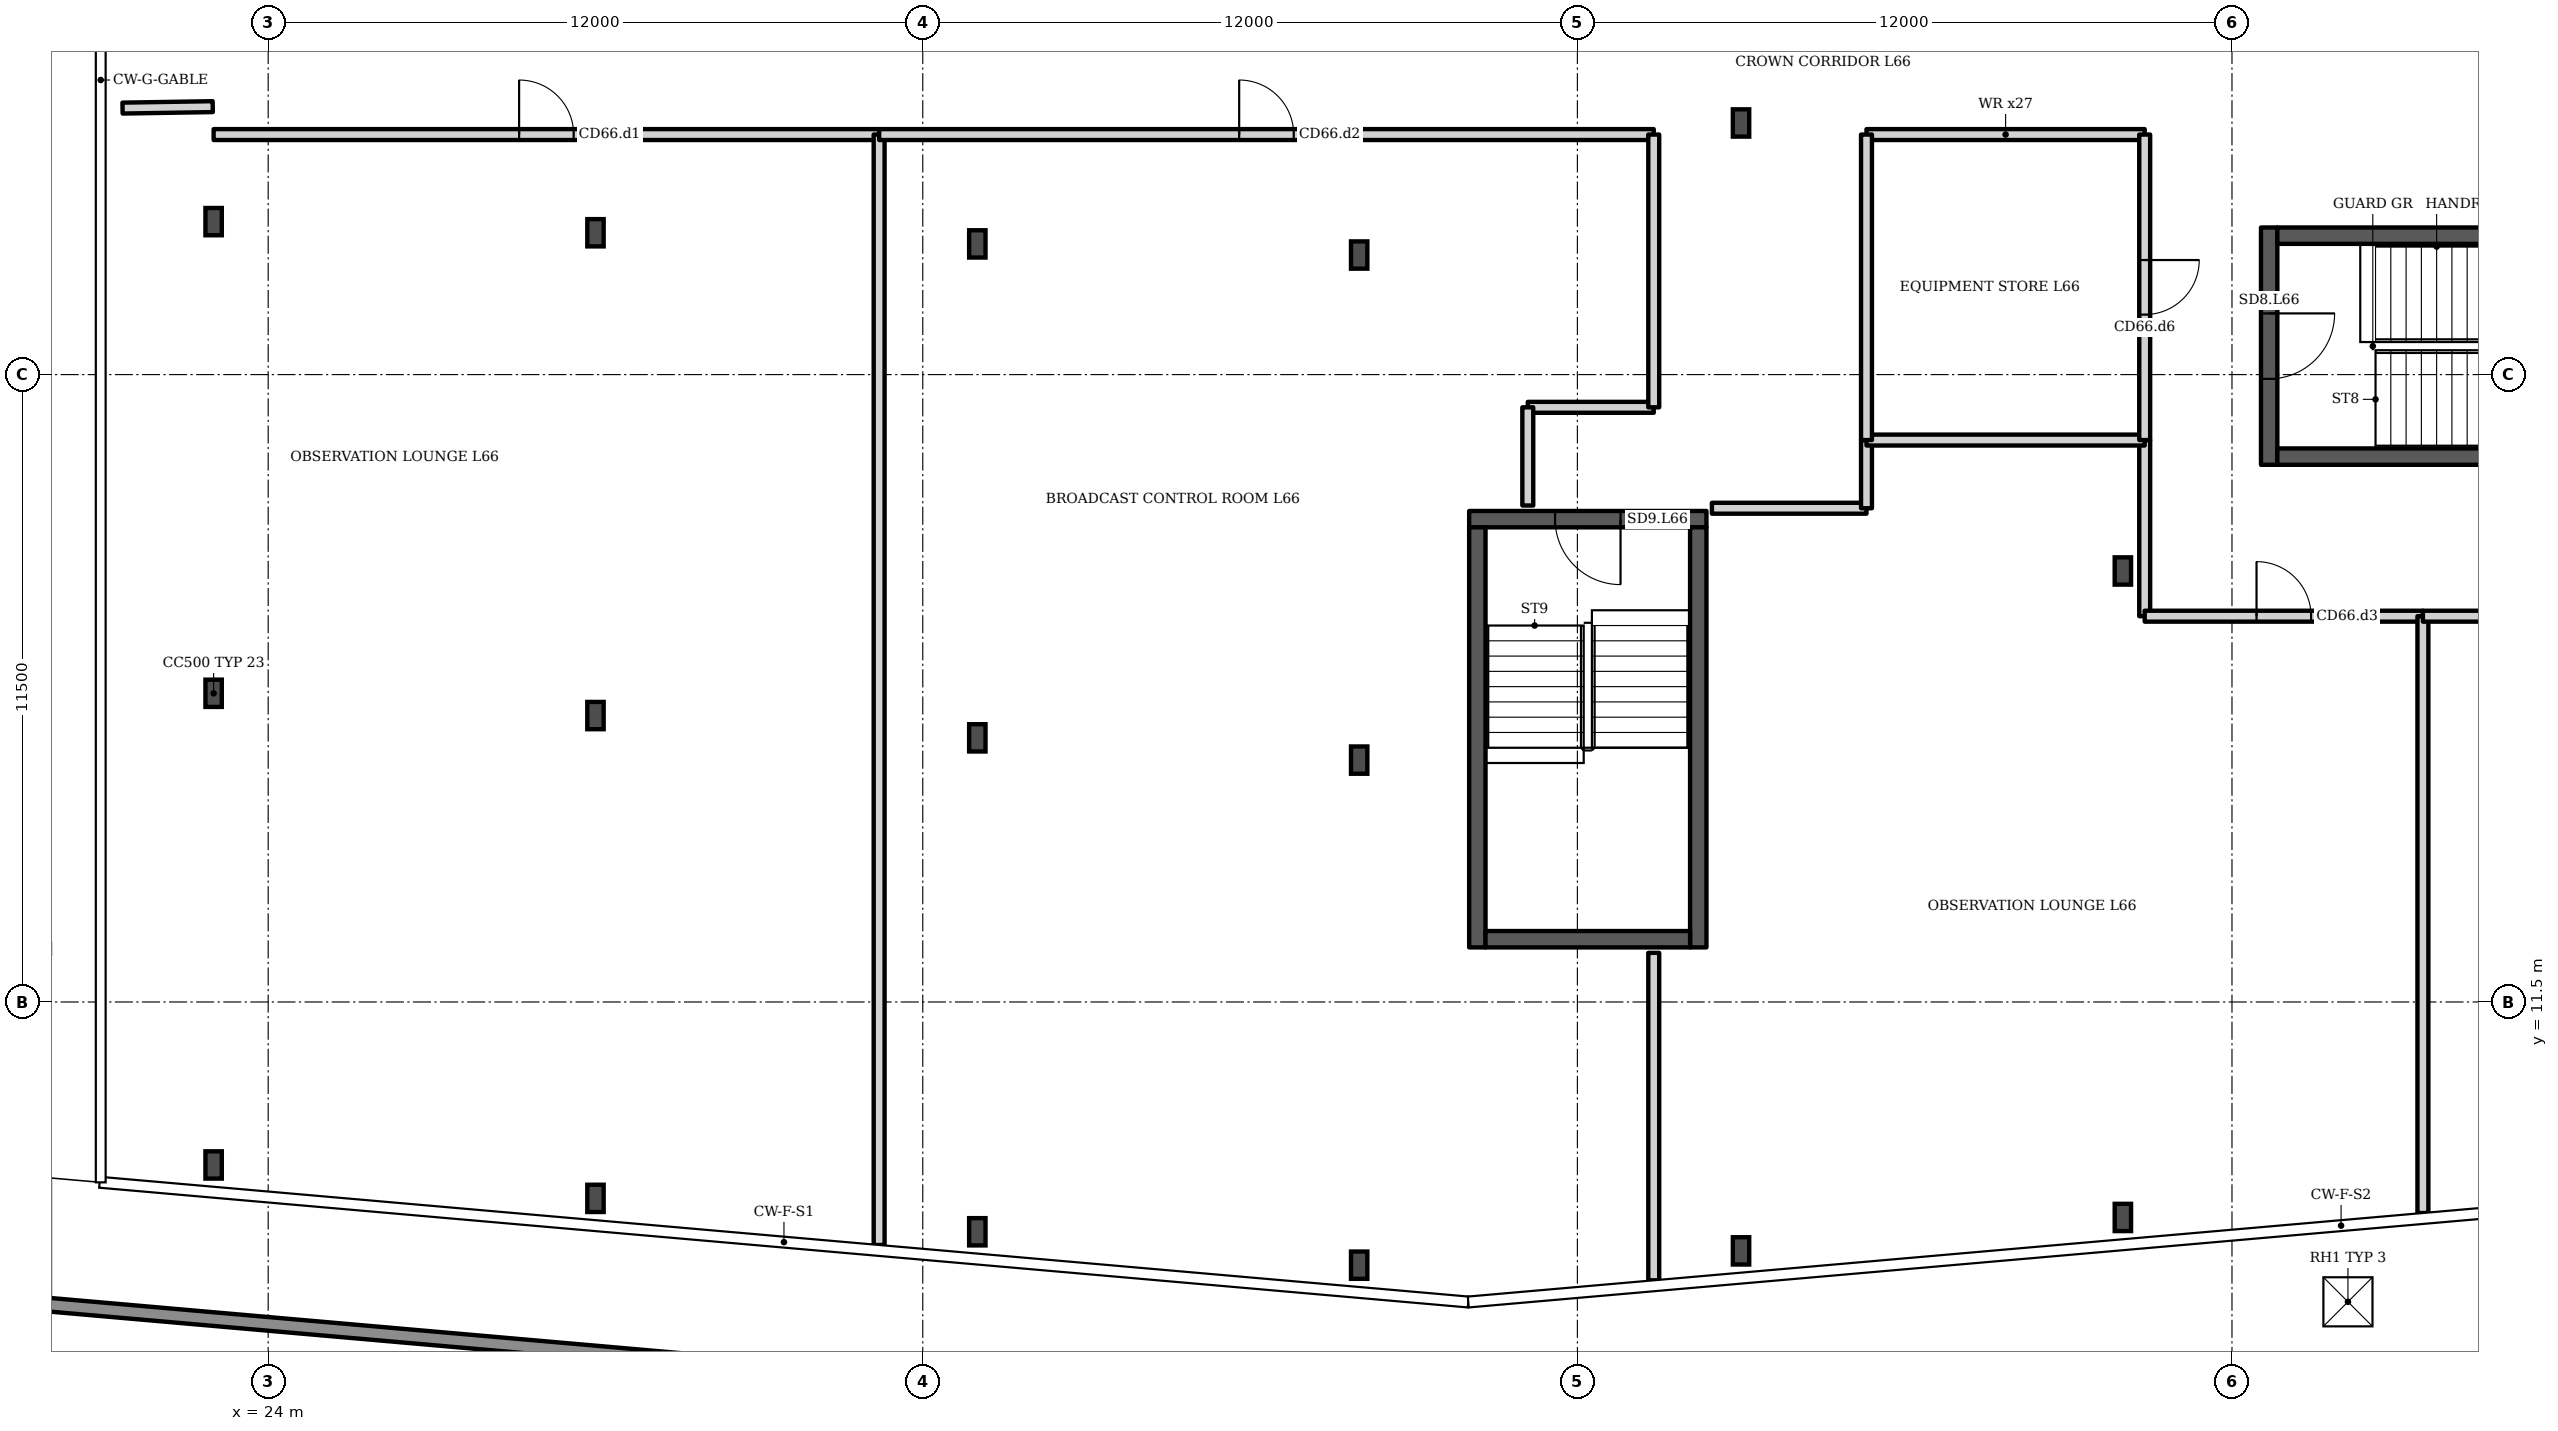
"""IFC4 building model, lengths in metres.
Left out: names, types, materials, properties, quantities, classifications, styles, units other than length and angle.
Written with IfcOpenShell. Run it as: python <this file> out.ifc"""

import sys

from ifc_helpers import new_model, si_unit, direction, frame, frame_2d, origin, origin_2d, place, context, subcontext, project, spatial, rectangle, i_section, extrude, element, fill, save


model = new_model("IFC4")
c1 = context("Model", 3, precision=1e-05, world=origin(), true_north=direction((0.0, 1.0)))
c2 = subcontext(c1, "Body", "Model", "MODEL_VIEW")
j1 = project(units=[si_unit("LENGTHUNIT", "METRE"), si_unit("PLANEANGLEUNIT", "RADIAN")], contexts=[c1])
p1 = place(None, origin())
s1 = spatial("IfcSite", under=j1, at=p1, CompositionType="ELEMENT")
p2 = place(p1, origin())
s2 = spatial("IfcBuilding", under=s1, at=p2, CompositionType="ELEMENT")
p3 = place(p2, frame((0.0, 0.0, 261.1)))
s3 = spatial("IfcBuildingStorey", under=s2, at=p3, CompositionType="ELEMENT", Elevation=261.1)
for number, where, z_axis, x_axis in (
    (1, (23.0, 8.513, 0.0), (0.0, 0.0, 1.0), (1.0, 0.0, 0.0)),
    (2, (23.0, 17.158, 0.0), (0.0, 0.0, 1.0), (1.0, 0.0, 0.0)),
    (3, (23.0, 25.804, 0.0), (0.0, 0.0, 1.0), (1.0, 0.0, 0.0)),
):
    element("IfcColumn", number, at=place(p3, frame(where, z_axis=z_axis, x_axis=x_axis)), inside=s3, PredefinedType="COLUMN", context=c2, shape_type="SweptSolid", body=[
        extrude(i_section(OverallWidth=0.3, OverallDepth=0.5, WebThickness=0.014, FlangeThickness=0.028, FilletRadius=0.027, at=origin_2d()), origin(), (0.0, 0.0, 1.0), 2.365),
    ])
for number, where, z_axis, x_axis in (
    (4, (30.0, 7.9, 0.0), (0.0, 0.0, 1.0), (1.0, 0.0, 0.0)),
    (5, (30.0, 16.75, 0.0), (0.0, 0.0, 1.0), (1.0, 0.0, 0.0)),
    (6, (30.0, 25.6, 0.0), (0.0, 0.0, 1.0), (1.0, 0.0, 0.0)),
):
    element("IfcColumn", number, at=place(p3, frame(where, z_axis=z_axis, x_axis=x_axis)), inside=s3, PredefinedType="COLUMN", context=c2, shape_type="SweptSolid", body=[
        extrude(i_section(OverallWidth=0.3, OverallDepth=0.5, WebThickness=0.014, FlangeThickness=0.028, FilletRadius=0.027, at=origin_2d()), origin(), (0.0, 0.0, 1.0), 5.194),
    ])
for number, where, z_axis, x_axis in (
    (7, (37.0, 7.288, 0.0), (0.0, 0.0, 1.0), (1.0, 0.0, 0.0)),
    (8, (37.0, 16.342, 0.0), (0.0, 0.0, 1.0), (1.0, 0.0, 0.0)),
    (9, (37.0, 25.396, 0.0), (0.0, 0.0, 1.0), (1.0, 0.0, 0.0)),
    (10, (44.0, 6.675, 0.0), (0.0, 0.0, 1.0), (1.0, 0.0, 0.0)),
    (11, (44.0, 15.934, 0.0), (0.0, 0.0, 1.0), (1.0, 0.0, 0.0)),
    (12, (44.0, 25.192, 0.0), (0.0, 0.0, 1.0), (1.0, 0.0, 0.0)),
    (13, (51.0, 6.938, 0.0), (0.0, 0.0, 1.0), (1.0, 0.0, 0.0)),
    (14, (51.0, 27.613, 0.0), (0.0, 0.0, 1.0), (1.0, 0.0, 0.0)),
    (15, (58.0, 7.55, 0.0), (0.0, 0.0, 1.0), (1.0, 0.0, 0.0)),
    (16, (58.0, 19.4, 0.0), (0.0, 0.0, 1.0), (1.0, 0.0, 0.0)),
):
    element("IfcColumn", number, at=place(p3, frame(where, z_axis=z_axis, x_axis=x_axis)), inside=s3, PredefinedType="COLUMN", context=c2, shape_type="SweptSolid", body=[
        extrude(i_section(OverallWidth=0.3, OverallDepth=0.5, WebThickness=0.014, FlangeThickness=0.028, FilletRadius=0.027, at=origin_2d()), origin(), (0.0, 0.0, 1.0), 3.2),
    ])
p4 = place(p3, frame((79.305, 5.976, 0.0), z_axis=(0.0, 0.0, 1.0), x_axis=(-0.996196, -0.087159, 0.0)))
e17 = element("IfcWall", 17, at=p4, inside=s3, PredefinedType="PARAPET", context=c2, shape_type="SweptSolid", body=[
    extrude(rectangle(XDim=29.918, YDim=0.25, at=frame_2d((14.959, 0.0))), origin(), (0.0, 0.0, 1.0), 1.1),
])
p5 = place(p3, frame((49.47, 3.371, 0.0), z_axis=(0.0, 0.0, 1.0), x_axis=(-0.996191, 0.087154, 0.0)))
e18 = element("IfcWall", 18, at=p5, inside=s3, PredefinedType="PARAPET", context=c2, shape_type="SweptSolid", body=[
    extrude(rectangle(XDim=29.833, YDim=0.25, at=frame_2d((14.917, 0.0))), origin(), (0.0, 0.0, 1.0), 1.1),
])
p6 = place(p3, frame((23.0, 27.4, 0.0), z_axis=(0.0, 0.0, 1.0), x_axis=(1.0, 0.0, 0.0)))
e19 = element("IfcWall", 19, at=p6, inside=s3, PredefinedType="PARTITIONING", context=c2, shape_type="SweptSolid", body=[
    extrude(rectangle(XDim=12.2, YDim=0.2, at=frame_2d((6.1, 0.0))), origin(), (0.0, 0.0, 1.0), 2.8),
])
p7 = place(p6, frame((5.6, 0.0, 0.0)))
e20 = element("IfcOpeningElement", 20, at=p7, cuts=e19, PredefinedType="OPENING", context=c2, shape_type="SweptSolid", body=[
    extrude(rectangle(XDim=1.0, YDim=2.1, at=frame_2d((0.5, 1.05))), frame((0.0, 0.11, 0.0), z_axis=(0.0, -1.0, 0.0), x_axis=(1.0, 0.0, 0.0)), (0.0, 0.0, 1.0), 0.22),
])
p8 = place(p3, frame((35.2, 27.4, 0.0), z_axis=(0.0, 0.0, 1.0), x_axis=(0.0, -1.0, 0.0)))
e21 = element("IfcWall", 21, at=p8, inside=s3, PredefinedType="PARTITIONING", context=c2, shape_type="SweptSolid", body=[
    extrude(rectangle(XDim=20.354, YDim=0.2, at=frame_2d((10.177, 0.0))), origin(), (0.0, 0.0, 1.0), 2.8),
])
p9 = place(p3, frame((49.4, 22.4, 0.0), z_axis=(0.0, 0.0, 1.0), x_axis=(-1.0, 0.0, 0.0)))
e22 = element("IfcWall", 22, at=p9, inside=s3, PredefinedType="PARTITIONING", context=c2, shape_type="SweptSolid", body=[
    extrude(rectangle(XDim=2.309, YDim=0.2, at=frame_2d((1.154, 0.0))), origin(), (0.0, 0.0, 1.0), 2.8),
])
p10 = place(p3, frame((47.091, 22.4, 0.0), z_axis=(0.0, 0.0, 1.0), x_axis=(0.0, -1.0, 0.0)))
e23 = element("IfcWall", 23, at=p10, inside=s3, PredefinedType="PARTITIONING", context=c2, shape_type="SweptSolid", body=[
    extrude(rectangle(XDim=1.8, YDim=0.2, at=frame_2d((0.9, 0.0))), origin(), (0.0, 0.0, 1.0), 2.8),
])
p11 = place(p3, frame((35.2, 27.4, 0.0), z_axis=(0.0, 0.0, 1.0), x_axis=(1.0, 0.0, 0.0)))
e24 = element("IfcWall", 24, at=p11, inside=s3, PredefinedType="PARTITIONING", context=c2, shape_type="SweptSolid", body=[
    extrude(rectangle(XDim=14.2, YDim=0.2, at=frame_2d((7.1, 0.0))), origin(), (0.0, 0.0, 1.0), 2.8),
])
p12 = place(p11, frame((6.6, 0.0, 0.0)))
e25 = element("IfcOpeningElement", 25, at=p12, cuts=e24, PredefinedType="OPENING", context=c2, shape_type="SweptSolid", body=[
    extrude(rectangle(XDim=1.0, YDim=2.1, at=frame_2d((0.5, 1.05))), frame((0.0, 0.11, 0.0), z_axis=(0.0, -1.0, 0.0), x_axis=(1.0, 0.0, 0.0)), (0.0, 0.0, 1.0), 0.22),
])
p13 = place(p3, frame((49.4, 12.4, 0.0), z_axis=(0.0, 0.0, 1.0), x_axis=(0.0, -1.0, 0.0)))
e26 = element("IfcWall", 26, at=p13, inside=s3, PredefinedType="PARTITIONING", context=c2, shape_type="SweptSolid", body=[
    extrude(rectangle(XDim=6.002, YDim=0.2, at=frame_2d((3.001, 0.0))), origin(), (0.0, 0.0, 1.0), 2.8),
])
p14 = place(p3, frame((50.466, 20.55, 0.0), z_axis=(0.0, 0.0, 1.0), x_axis=(1.0, 0.0, 0.0)))
e27 = element("IfcWall", 27, at=p14, inside=s3, PredefinedType="PARTITIONING", context=c2, shape_type="SweptSolid", body=[
    extrude(rectangle(XDim=2.834, YDim=0.2, at=frame_2d((1.417, 0.0))), origin(), (0.0, 0.0, 1.0), 2.8),
])
p15 = place(p3, frame((53.3, 20.55, 0.0), z_axis=(0.0, 0.0, 1.0), x_axis=(0.0, 1.0, 0.0)))
e28 = element("IfcWall", 28, at=p15, inside=s3, PredefinedType="PARTITIONING", context=c2, shape_type="SweptSolid", body=[
    extrude(rectangle(XDim=1.25, YDim=0.2, at=frame_2d((0.625, 0.0))), origin(), (0.0, 0.0, 1.0), 2.8),
])
p16 = place(p3, frame((58.4, 21.8, 0.0), z_axis=(0.0, 0.0, 1.0), x_axis=(0.0, -1.0, 0.0)))
e29 = element("IfcWall", 29, at=p16, inside=s3, PredefinedType="PARTITIONING", context=c2, shape_type="SweptSolid", body=[
    extrude(rectangle(XDim=3.228, YDim=0.2, at=frame_2d((1.614, 0.0))), origin(), (0.0, 0.0, 1.0), 2.8),
])
p17 = place(p3, frame((58.4, 18.572, 0.0), z_axis=(0.0, 0.0, 1.0), x_axis=(1.0, 0.0, 0.0)))
e30 = element("IfcWall", 30, at=p17, inside=s3, PredefinedType="PARTITIONING", context=c2, shape_type="SweptSolid", body=[
    extrude(rectangle(XDim=5.1, YDim=0.2, at=frame_2d((2.55, 0.0))), origin(), (0.0, 0.0, 1.0), 2.8),
])
p18 = place(p17, frame((2.05, 0.0, 0.0)))
e31 = element("IfcOpeningElement", 31, at=p18, cuts=e30, PredefinedType="OPENING", context=c2, shape_type="SweptSolid", body=[
    extrude(rectangle(XDim=1.0, YDim=2.1, at=frame_2d((0.5, 1.05))), frame((0.0, 0.11, 0.0), z_axis=(0.0, -1.0, 0.0), x_axis=(1.0, 0.0, 0.0)), (0.0, 0.0, 1.0), 0.22),
])
p19 = place(p3, frame((63.5, 18.572, 0.0), z_axis=(0.0, 0.0, 1.0), x_axis=(0.0, -1.0, 0.0)))
e32 = element("IfcWall", 32, at=p19, inside=s3, PredefinedType="PARTITIONING", context=c2, shape_type="SweptSolid", body=[
    extrude(rectangle(XDim=10.94, YDim=0.2, at=frame_2d((5.47, 0.0))), origin(), (0.0, 0.0, 1.0), 2.8),
])
p20 = place(p3, frame((53.3, 21.8, 0.0), z_axis=(0.0, 0.0, 1.0), x_axis=(1.0, 0.0, 0.0)))
e33 = element("IfcWall", 33, at=p20, inside=s3, PredefinedType="PARTITIONING", context=c2, shape_type="SweptSolid", body=[
    extrude(rectangle(XDim=5.1, YDim=0.2, at=frame_2d((2.55, 0.0))), origin(), (0.0, 0.0, 1.0), 2.8),
])
p21 = place(p3, frame((63.5, 18.572, 0.0), z_axis=(0.0, 0.0, 1.0), x_axis=(1.0, 0.0, 0.0)))
e34 = element("IfcWall", 34, at=p21, inside=s3, PredefinedType="PARTITIONING", context=c2, shape_type="SweptSolid", body=[
    extrude(rectangle(XDim=2.257, YDim=0.2, at=frame_2d((1.128, 0.0))), origin(), (0.0, 0.0, 1.0), 2.8),
])
p22 = place(p3, frame((53.3, 27.4, 0.0), z_axis=(0.0, 0.0, 1.0), x_axis=(1.0, 0.0, 0.0)))
e35 = element("IfcWall", 35, at=p22, inside=s3, PredefinedType="PARTITIONING", context=c2, shape_type="SweptSolid", body=[
    extrude(rectangle(XDim=5.1, YDim=0.2, at=frame_2d((2.55, 0.0))), origin(), (0.0, 0.0, 1.0), 2.8),
])
p23 = place(p3, frame((58.4, 27.4, 0.0), z_axis=(0.0, 0.0, 1.0), x_axis=(0.0, -1.0, 0.0)))
e36 = element("IfcWall", 36, at=p23, inside=s3, PredefinedType="PARTITIONING", context=c2, shape_type="SweptSolid", body=[
    extrude(rectangle(XDim=5.6, YDim=0.2, at=frame_2d((2.8, 0.0))), origin(), (0.0, 0.0, 1.0), 2.8),
])
p24 = place(p23, frame((2.3, 0.0, 0.0)))
e37 = element("IfcOpeningElement", 37, at=p24, cuts=e36, PredefinedType="OPENING", context=c2, shape_type="SweptSolid", body=[
    extrude(rectangle(XDim=1.0, YDim=2.1, at=frame_2d((0.5, 1.05))), frame((0.0, 0.11, 0.0), z_axis=(0.0, -1.0, 0.0), x_axis=(1.0, 0.0, 0.0)), (0.0, 0.0, 1.0), 0.22),
])
p25 = place(p3, frame((53.3, 21.8, 0.0), z_axis=(0.0, 0.0, 1.0), x_axis=(0.0, 1.0, 0.0)))
e38 = element("IfcWall", 38, at=p25, inside=s3, PredefinedType="PARTITIONING", context=c2, shape_type="SweptSolid", body=[
    extrude(rectangle(XDim=5.6, YDim=0.2, at=frame_2d((2.8, 0.0))), origin(), (0.0, 0.0, 1.0), 2.8),
])
p26 = place(p3, frame((21.33, 27.885, 0.0), z_axis=(0.0, 0.0, 1.0), x_axis=(0.999874, 0.016094, 0.0)))
e39 = element("IfcWall", 39, at=p26, inside=s3, PredefinedType="PARTITIONING", context=c2, shape_type="SweptSolid", body=[
    extrude(rectangle(XDim=1.654, YDim=0.2, at=frame_2d((0.827, 0.0))), origin(), (0.0, 0.0, 1.0), 2.8),
])
p27 = place(p3, frame((49.4, 27.4, 0.0), z_axis=(0.0, 0.0, 1.0), x_axis=(0.0, -1.0, 0.0)))
e40 = element("IfcWall", 40, at=p27, inside=s3, PredefinedType="PARTITIONING", context=c2, shape_type="SweptSolid", body=[
    extrude(rectangle(XDim=5.0, YDim=0.2, at=frame_2d((2.5, 0.0))), origin(), (0.0, 0.0, 1.0), 2.8),
])
p28 = place(p3, frame((60.682, 21.347, 0.0), z_axis=(0.0, 0.0, 1.0), x_axis=(0.0, 1.0, 0.0)))
e41 = element("IfcWall", 41, at=p28, inside=s3, PredefinedType="SHEAR", context=c2, shape_type="SweptSolid", body=[
    extrude(rectangle(XDim=4.35, YDim=0.3, at=frame_2d((2.175, 0.0))), origin(), (0.0, 0.0, 1.0), 2.8),
])
p29 = place(p28, frame((1.575, 0.0, 0.0)))
e42 = element("IfcOpeningElement", 42, at=p29, cuts=e41, PredefinedType="OPENING", context=c2, shape_type="SweptSolid", body=[
    extrude(rectangle(XDim=1.2, YDim=2.1, at=frame_2d((0.6, 1.05))), frame((0.0, 0.16, 0.0), z_axis=(0.0, -1.0, 0.0), x_axis=(1.0, 0.0, 0.0)), (0.0, 0.0, 1.0), 0.32),
])
p30 = place(p3, frame((46.016, 20.35, 0.0), z_axis=(0.0, 0.0, 1.0), x_axis=(1.0, 0.0, 0.0)))
e43 = element("IfcWall", 43, at=p30, inside=s3, PredefinedType="SHEAR", context=c2, shape_type="SweptSolid", body=[
    extrude(rectangle(XDim=4.35, YDim=0.3, at=frame_2d((2.175, 0.0))), origin(), (0.0, 0.0, 1.0), 2.8),
])
p31 = place(p30, frame((1.575, 0.0, 0.0)))
e44 = element("IfcOpeningElement", 44, at=p31, cuts=e43, PredefinedType="OPENING", context=c2, shape_type="SweptSolid", body=[
    extrude(rectangle(XDim=1.2, YDim=2.1, at=frame_2d((0.6, 1.05))), frame((0.0, 0.16, 0.0), z_axis=(0.0, -1.0, 0.0), x_axis=(1.0, 0.0, 0.0)), (0.0, 0.0, 1.0), 0.32),
])
for number, where, z_axis, x_axis in (
    (45, (60.832, 21.497, 0.0), (0.0, 0.0, 1.0), (1.0, 0.0, 0.0)),
    (46, (60.832, 25.547, 0.0), (0.0, 0.0, 1.0), (1.0, 0.0, 0.0)),
    (47, (46.166, 12.5, 0.0), (0.0, 0.0, 1.0), (0.0, 1.0, 0.0)),
    (48, (50.216, 12.5, 0.0), (0.0, 0.0, 1.0), (0.0, 1.0, 0.0)),
):
    element("IfcWall", number, at=place(p3, frame(where, z_axis=z_axis, x_axis=x_axis)), inside=s3, PredefinedType="SHEAR", context=c2, shape_type="SweptSolid", body=[
        extrude(rectangle(XDim=7.7, YDim=0.3, at=frame_2d((3.85, 0.0))), origin(), (0.0, 0.0, 1.0), 2.8),
    ])
p32 = place(p3, frame((46.316, 12.65, 0.0), z_axis=(0.0, 0.0, 1.0), x_axis=(1.0, 0.0, 0.0)))
e49 = element("IfcWall", 49, at=p32, inside=s3, PredefinedType="SHEAR", context=c2, shape_type="SweptSolid", body=[
    extrude(rectangle(XDim=3.75, YDim=0.3, at=frame_2d((1.875, 0.0))), origin(), (0.0, 0.0, 1.0), 2.8),
])
p33 = place(p3, frame((0.0, 0.0, -0.4)))
p34 = place(p33, frame((62.126, 6.004, 0.0)))
p35 = place(p34, frame((0.0, 0.0, 0.36)))
e50 = element("IfcDoor", 50, at=p35, inside=s3, OperationType="SINGLE_SWING_LEFT", PredefinedType="TRAPDOOR", context=c2, shape_type="SweptSolid", body=[
    extrude(rectangle(XDim=0.9, YDim=0.9, at=origin_2d()), origin(), (0.0, 0.0, 1.0), 0.05),
])
p36 = place(p7, origin())
e51 = element("IfcDoor", 51, at=p36, inside=s3, OperationType="SINGLE_SWING_LEFT", PredefinedType="DOOR", context=c2, shape_type="SweptSolid", body=[
    extrude(rectangle(XDim=1.0, YDim=2.1, at=frame_2d((0.5, 1.05))), frame((0.0, 0.025, 0.0), z_axis=(0.0, -1.0, 0.0), x_axis=(1.0, 0.0, 0.0)), (0.0, 0.0, 1.0), 0.05),
])
fill(e20, e51)
p37 = place(p12, origin())
e52 = element("IfcDoor", 52, at=p37, inside=s3, OperationType="SINGLE_SWING_LEFT", PredefinedType="DOOR", context=c2, shape_type="SweptSolid", body=[
    extrude(rectangle(XDim=1.0, YDim=2.1, at=frame_2d((0.5, 1.05))), frame((0.0, 0.025, 0.0), z_axis=(0.0, -1.0, 0.0), x_axis=(1.0, 0.0, 0.0)), (0.0, 0.0, 1.0), 0.05),
])
fill(e25, e52)
p38 = place(p18, origin())
e53 = element("IfcDoor", 53, at=p38, inside=s3, OperationType="SINGLE_SWING_LEFT", PredefinedType="DOOR", context=c2, shape_type="SweptSolid", body=[
    extrude(rectangle(XDim=1.0, YDim=2.1, at=frame_2d((0.5, 1.05))), frame((0.0, 0.025, 0.0), z_axis=(0.0, -1.0, 0.0), x_axis=(1.0, 0.0, 0.0)), (0.0, 0.0, 1.0), 0.05),
])
fill(e31, e53)
p39 = place(p24, origin())
e54 = element("IfcDoor", 54, at=p39, inside=s3, OperationType="SINGLE_SWING_LEFT", PredefinedType="DOOR", context=c2, shape_type="SweptSolid", body=[
    extrude(rectangle(XDim=1.0, YDim=2.1, at=frame_2d((0.5, 1.05))), frame((0.0, 0.025, 0.0), z_axis=(0.0, -1.0, 0.0), x_axis=(1.0, 0.0, 0.0)), (0.0, 0.0, 1.0), 0.05),
])
fill(e37, e54)
p40 = place(p29, origin())
e55 = element("IfcDoor", 55, at=p40, inside=s3, OperationType="SINGLE_SWING_RIGHT", PredefinedType="DOOR", context=c2, shape_type="SweptSolid", body=[
    extrude(rectangle(XDim=1.2, YDim=2.1, at=frame_2d((0.6, 1.05))), frame((0.0, 0.025, 0.0), z_axis=(0.0, -1.0, 0.0), x_axis=(1.0, 0.0, 0.0)), (0.0, 0.0, 1.0), 0.05),
])
fill(e42, e55)
p41 = place(p31, origin())
e56 = element("IfcDoor", 56, at=p41, inside=s3, OperationType="SINGLE_SWING_RIGHT", PredefinedType="DOOR", context=c2, shape_type="SweptSolid", body=[
    extrude(rectangle(XDim=1.2, YDim=2.1, at=frame_2d((0.6, 1.05))), frame((0.0, 0.025, 0.0), z_axis=(0.0, -1.0, 0.0), x_axis=(1.0, 0.0, 0.0)), (0.0, 0.0, 1.0), 0.05),
])
fill(e44, e56)
save(model, sys.argv[1])
